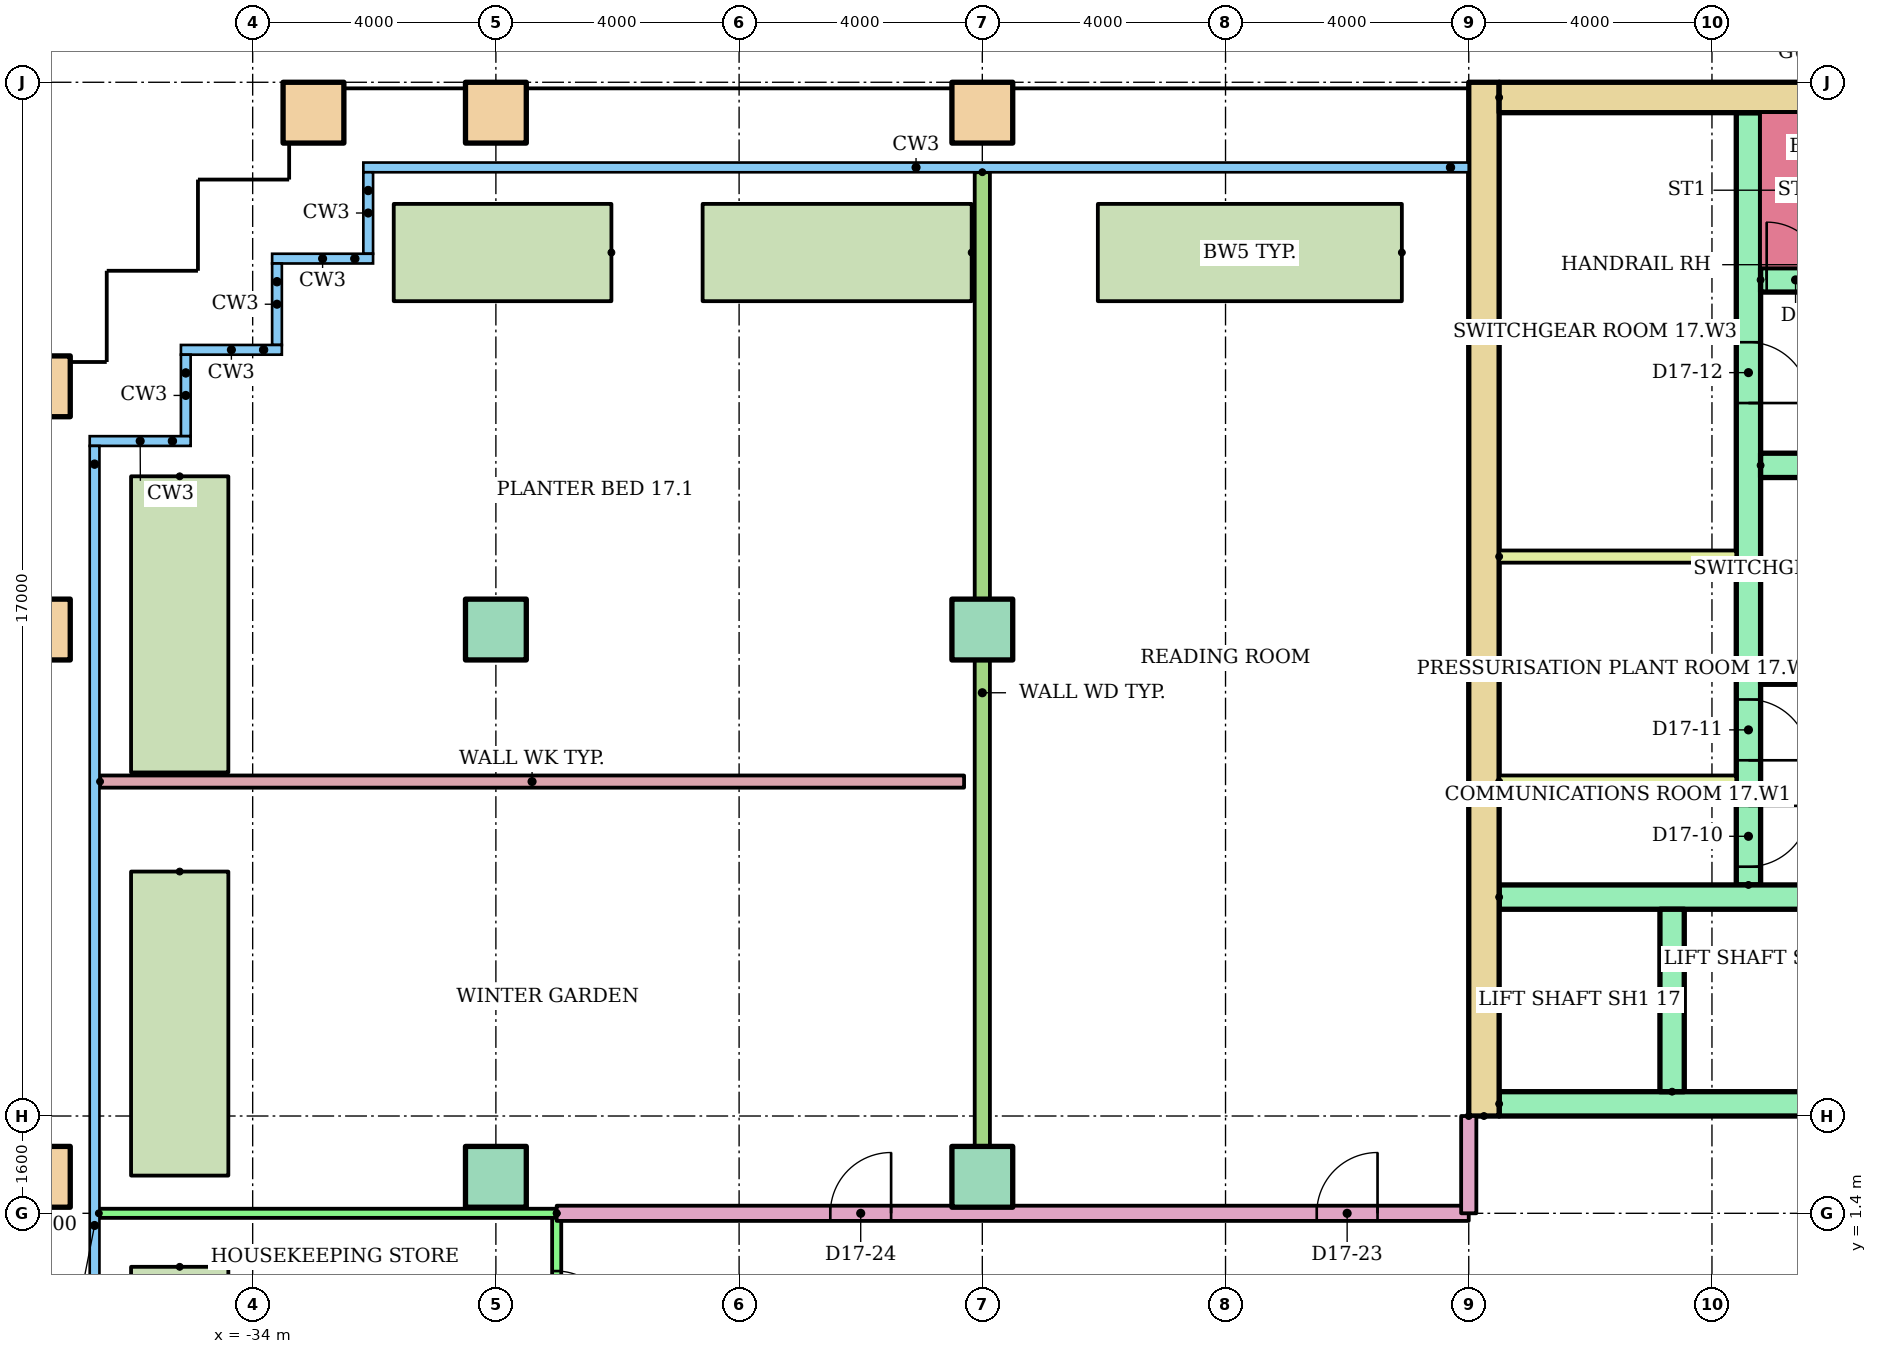
"""IFC4 building model, lengths in metres.
Left out: names, types, materials, properties, quantities, classifications, styles, units other than length and angle.
Written with IfcOpenShell. Run it as: python <this file> out.ifc"""

import sys

from ifc_helpers import new_model, si_unit, direction, frame, frame_2d, origin, origin_2d, place, context, subcontext, project, spatial, rectangle, hollow_rectangle, extrude, element, fill, save


model = new_model("IFC4")
c1 = context("Model", 3, precision=1e-05, world=origin(), true_north=direction((0.0, 1.0)))
c2 = subcontext(c1, "Body", "Model", "MODEL_VIEW")
j1 = project(units=[si_unit("LENGTHUNIT", "METRE"), si_unit("PLANEANGLEUNIT", "RADIAN")], contexts=[c1])
p1 = place(None, origin())
s1 = spatial("IfcSite", under=j1, at=p1, CompositionType="ELEMENT")
p2 = place(p1, origin())
s2 = spatial("IfcBuilding", under=s1, at=p2, CompositionType="ELEMENT")
p3 = place(p2, frame((0.0, 0.0, 64.0)))
s3 = spatial("IfcBuildingStorey", under=s2, at=p3, CompositionType="ELEMENT", Elevation=64.0)
p4 = place(p3, frame((-37.5, 2.0, 0.0)))
e1 = element("IfcColumn", 1, at=p4, inside=s3, PredefinedType="COLUMN", context=c2, shape_type="SweptSolid", body=[
    extrude(hollow_rectangle(XDim=1.0, YDim=1.0, WallThickness=0.05, at=origin_2d()), origin(), (0.0, 0.0, 1.0), 9.25),
])
p5 = place(p3, frame((-30.0, 2.0, 0.0)))
e2 = element("IfcColumn", 2, at=p5, inside=s3, PredefinedType="COLUMN", context=c2, shape_type="SweptSolid", body=[
    extrude(rectangle(XDim=1.0, YDim=1.0, at=origin_2d()), origin(), (0.0, 0.0, 1.0), 8.8),
])
p6 = place(p3, frame((-22.0, 2.0, 0.0)))
e3 = element("IfcColumn", 3, at=p6, inside=s3, PredefinedType="COLUMN", context=c2, shape_type="SweptSolid", body=[
    extrude(rectangle(XDim=1.0, YDim=1.0, at=origin_2d()), origin(), (0.0, 0.0, 1.0), 9.6),
])
p7 = place(p3, frame((-37.5, 11.0, 0.0)))
e4 = element("IfcColumn", 4, at=p7, inside=s3, PredefinedType="COLUMN", context=c2, shape_type="SweptSolid", body=[
    extrude(hollow_rectangle(XDim=1.0, YDim=1.0, WallThickness=0.05, at=origin_2d()), origin(), (0.0, 0.0, 1.0), 9.25),
])
p8 = place(p3, frame((-30.0, 11.0, 0.0)))
e5 = element("IfcColumn", 5, at=p8, inside=s3, PredefinedType="COLUMN", context=c2, shape_type="SweptSolid", body=[
    extrude(rectangle(XDim=1.0, YDim=1.0, at=origin_2d()), origin(), (0.0, 0.0, 1.0), 8.8),
])
p9 = place(p3, frame((-22.0, 11.0, 0.0)))
e6 = element("IfcColumn", 6, at=p9, inside=s3, PredefinedType="COLUMN", context=c2, shape_type="SweptSolid", body=[
    extrude(rectangle(XDim=1.0, YDim=1.0, at=origin_2d()), origin(), (0.0, 0.0, 1.0), 9.6),
])
for number, where in (
    (7, (-37.5, 15.0, 0.0)),
    (8, (-33.0, 19.5, 0.0)),
):
    element("IfcColumn", number, at=place(p3, frame(where)), inside=s3, PredefinedType="COLUMN", context=c2, shape_type="SweptSolid", body=[
        extrude(hollow_rectangle(XDim=1.0, YDim=1.0, WallThickness=0.05, at=origin_2d()), origin(), (0.0, 0.0, 1.0), 9.25),
    ])
p10 = place(p3, frame((-30.0, 19.5, 0.0)))
e9 = element("IfcColumn", 9, at=p10, inside=s3, PredefinedType="COLUMN", context=c2, shape_type="SweptSolid", body=[
    extrude(hollow_rectangle(XDim=1.0, YDim=1.0, WallThickness=0.05, at=origin_2d()), origin(), (0.0, 0.0, 1.0), 8.8),
])
p11 = place(p3, frame((-22.0, 19.5, 0.0)))
e10 = element("IfcColumn", 10, at=p11, inside=s3, PredefinedType="COLUMN", context=c2, shape_type="SweptSolid", body=[
    extrude(hollow_rectangle(XDim=1.0, YDim=1.0, WallThickness=0.05, at=origin_2d()), origin(), (0.0, 0.0, 1.0), 9.6),
])
p12 = place(p3, frame((-15.1, 17.2, 0.0), z_axis=(0.0, 0.0, 1.0), x_axis=(-1.0, 0.0, 0.0)))
e11 = element("IfcWall", 11, at=p12, inside=s3, PredefinedType="STANDARD", context=c2, shape_type="SweptSolid", body=[
    extrude(rectangle(XDim=5.0, YDim=1.6, at=frame_2d((2.5, 0.0))), origin(), (0.0, 0.0, 1.0), 0.8),
])
p13 = place(p3, frame((-28.1, 17.2, 0.0), z_axis=(0.0, 0.0, 1.0), x_axis=(-1.0, 0.0, 0.0)))
e12 = element("IfcWall", 12, at=p13, inside=s3, PredefinedType="STANDARD", context=c2, shape_type="SweptSolid", body=[
    extrude(rectangle(XDim=3.58, YDim=1.6, at=frame_2d((1.79, 0.0))), origin(), (0.0, 0.0, 1.0), 0.8),
])
p14 = place(p3, frame((-35.2, 7.02, 0.0), z_axis=(0.0, 0.0, 1.0), x_axis=(0.0, -1.0, 0.0)))
e13 = element("IfcWall", 13, at=p14, inside=s3, PredefinedType="STANDARD", context=c2, shape_type="SweptSolid", body=[
    extrude(rectangle(XDim=5.0, YDim=1.6, at=frame_2d((2.5, 0.0))), origin(), (0.0, 0.0, 1.0), 0.8),
])
p15 = place(p3, frame((-13.75, 3.0, 0.0), z_axis=(0.0, 0.0, 1.0), x_axis=(0.0, 1.0, 0.0)))
e14 = element("IfcWall", 14, at=p15, inside=s3, PredefinedType="SHEAR", context=c2, shape_type="SweptSolid", body=[
    extrude(rectangle(XDim=17.0, YDim=0.5, at=frame_2d((8.5, 0.0))), origin(), (0.0, 0.0, 1.0), 8.8),
])
p16 = place(p3, frame((-13.5, 19.75, 0.0)))
e15 = element("IfcWall", 15, at=p16, inside=s3, PredefinedType="SHEAR", context=c2, shape_type="SweptSolid", body=[
    extrude(rectangle(XDim=27.0, YDim=0.5, at=frame_2d((13.5, 0.0))), origin(), (0.0, 0.0, 1.0), 8.8),
])
p17 = place(p3, frame((-9.4, 6.8, 0.0), z_axis=(0.0, 0.0, 1.0), x_axis=(0.0, 1.0, 0.0)))
e16 = element("IfcWall", 16, at=p17, inside=s3, PredefinedType="SHEAR", context=c2, shape_type="SweptSolid", body=[
    extrude(rectangle(XDim=12.7, YDim=0.4, at=frame_2d((6.35, 0.0))), origin(), (0.0, 0.0, 1.0), 8.8),
])
p18 = place(p17, frame((0.3, 0.0, 0.0)))
e17 = element("IfcOpeningElement", 17, at=p18, cuts=e16, PredefinedType="OPENING", context=c2, shape_type="SweptSolid", body=[
    extrude(rectangle(XDim=1.0, YDim=2.1, at=frame_2d((0.5, 1.05))), frame((0.0, 0.21, 0.0), z_axis=(0.0, -1.0, 0.0), x_axis=(1.0, 0.0, 0.0)), (0.0, 0.0, 1.0), 0.42),
])
p19 = place(p17, frame((2.05, 0.0, 0.0)))
e18 = element("IfcOpeningElement", 18, at=p19, cuts=e16, PredefinedType="OPENING", context=c2, shape_type="SweptSolid", body=[
    extrude(rectangle(XDim=1.0, YDim=2.1, at=frame_2d((0.5, 1.05))), frame((0.0, 0.21, 0.0), z_axis=(0.0, -1.0, 0.0), x_axis=(1.0, 0.0, 0.0)), (0.0, 0.0, 1.0), 0.42),
])
p20 = place(p17, frame((7.925, 0.0, 0.0)))
e19 = element("IfcOpeningElement", 19, at=p20, cuts=e16, PredefinedType="OPENING", context=c2, shape_type="SweptSolid", body=[
    extrude(rectangle(XDim=1.0, YDim=2.1, at=frame_2d((0.5, 1.05))), frame((0.0, 0.21, 0.0), z_axis=(0.0, -1.0, 0.0), x_axis=(1.0, 0.0, 0.0)), (0.0, 0.0, 1.0), 0.42),
])
p21 = place(p3, frame((-13.5, 3.2, 0.0)))
e20 = element("IfcWall", 20, at=p21, inside=s3, PredefinedType="SHEAR", context=c2, shape_type="SweptSolid", body=[
    extrude(rectangle(XDim=27.0, YDim=0.4, at=frame_2d((13.5, 0.0))), origin(), (0.0, 0.0, 1.0), 8.8),
])
p22 = place(p21, frame((6.861, 0.0, 0.0)))
e21 = element("IfcOpeningElement", 21, at=p22, cuts=e20, PredefinedType="OPENING", context=c2, shape_type="SweptSolid", body=[
    extrude(rectangle(XDim=1.1, YDim=2.1, at=frame_2d((0.55, 1.05))), frame((0.0, 0.21, 0.0), z_axis=(0.0, -1.0, 0.0), x_axis=(1.0, 0.0, 0.0)), (0.0, 0.0, 1.0), 0.42),
])
p23 = place(p21, frame((9.906, 0.0, 0.0)))
e22 = element("IfcOpeningElement", 22, at=p23, cuts=e20, PredefinedType="OPENING", context=c2, shape_type="SweptSolid", body=[
    extrude(rectangle(XDim=1.1, YDim=2.1, at=frame_2d((0.55, 1.05))), frame((0.0, 0.21, 0.0), z_axis=(0.0, -1.0, 0.0), x_axis=(1.0, 0.0, 0.0)), (0.0, 0.0, 1.0), 0.42),
])
p24 = place(p21, frame((15.994, 0.0, 0.0)))
e23 = element("IfcOpeningElement", 23, at=p24, cuts=e20, PredefinedType="OPENING", context=c2, shape_type="SweptSolid", body=[
    extrude(rectangle(XDim=1.1, YDim=2.1, at=frame_2d((0.55, 1.05))), frame((0.0, 0.21, 0.0), z_axis=(0.0, -1.0, 0.0), x_axis=(1.0, 0.0, 0.0)), (0.0, 0.0, 1.0), 0.42),
])
p25 = place(p21, frame((19.039, 0.0, 0.0)))
e24 = element("IfcOpeningElement", 24, at=p25, cuts=e20, PredefinedType="OPENING", context=c2, shape_type="SweptSolid", body=[
    extrude(rectangle(XDim=1.1, YDim=2.1, at=frame_2d((0.55, 1.05))), frame((0.0, 0.21, 0.0), z_axis=(0.0, -1.0, 0.0), x_axis=(1.0, 0.0, 0.0)), (0.0, 0.0, 1.0), 0.42),
])
p26 = place(p21, frame((12.6, 0.0, 0.0)))
e25 = element("IfcOpeningElement", 25, at=p26, cuts=e20, PredefinedType="OPENING", context=c2, shape_type="SweptSolid", body=[
    extrude(rectangle(XDim=1.8, YDim=2.1, at=frame_2d((0.9, 1.05))), frame((0.0, 0.21, 0.0), z_axis=(0.0, -1.0, 0.0), x_axis=(1.0, 0.0, 0.0)), (0.0, 0.0, 1.0), 0.42),
])
p27 = place(p3, frame((-13.5, 6.6, 0.0)))
e26 = element("IfcWall", 26, at=p27, inside=s3, PredefinedType="SHEAR", context=c2, shape_type="SweptSolid", body=[
    extrude(rectangle(XDim=11.978, YDim=0.4, at=frame_2d((5.989, 0.0))), origin(), (0.0, 0.0, 1.0), 8.8),
])
p28 = place(p3, frame((-10.656, 3.4, 0.0), z_axis=(0.0, 0.0, 1.0), x_axis=(0.0, 1.0, 0.0)))
e27 = element("IfcWall", 27, at=p28, inside=s3, PredefinedType="SHEAR", context=c2, shape_type="SweptSolid", body=[
    extrude(rectangle(XDim=3.0, YDim=0.4, at=frame_2d((1.5, 0.0))), origin(), (0.0, 0.0, 1.0), 8.8),
])
p29 = place(p3, frame((-9.2, 10.3, 0.0)))
e28 = element("IfcWall", 28, at=p29, inside=s3, PredefinedType="SHEAR", context=c2, shape_type="SweptSolid", body=[
    extrude(rectangle(XDim=8.0, YDim=0.4, at=frame_2d((4.0, 0.0))), origin(), (0.0, 0.0, 1.0), 8.8),
])
p30 = place(p29, frame((0.917, 0.0, 0.0)))
e29 = element("IfcOpeningElement", 29, at=p30, cuts=e28, PredefinedType="OPENING", context=c2, shape_type="SweptSolid", body=[
    extrude(rectangle(XDim=1.0, YDim=2.1, at=frame_2d((0.5, 1.05))), frame((0.0, 0.21, 0.0), z_axis=(0.0, -1.0, 0.0), x_axis=(1.0, 0.0, 0.0)), (0.0, 0.0, 1.0), 0.42),
])
p31 = place(p29, frame((3.4, 0.0, 0.0)))
e30 = element("IfcOpeningElement", 30, at=p31, cuts=e28, PredefinedType="OPENING", context=c2, shape_type="SweptSolid", body=[
    extrude(rectangle(XDim=1.0, YDim=2.1, at=frame_2d((0.5, 1.05))), frame((0.0, 0.21, 0.0), z_axis=(0.0, -1.0, 0.0), x_axis=(1.0, 0.0, 0.0)), (0.0, 0.0, 1.0), 0.42),
])
p32 = place(p29, frame((6.133, 0.0, 0.0)))
e31 = element("IfcOpeningElement", 31, at=p32, cuts=e28, PredefinedType="OPENING", context=c2, shape_type="SweptSolid", body=[
    extrude(rectangle(XDim=1.0, YDim=2.1, at=frame_2d((0.5, 1.05))), frame((0.0, 0.21, 0.0), z_axis=(0.0, -1.0, 0.0), x_axis=(1.0, 0.0, 0.0)), (0.0, 0.0, 1.0), 0.42),
])
p33 = place(p3, frame((-9.2, 13.7, 0.0)))
e32 = element("IfcWall", 32, at=p33, inside=s3, PredefinedType="SHEAR", context=c2, shape_type="SweptSolid", body=[
    extrude(rectangle(XDim=8.0, YDim=0.4, at=frame_2d((4.0, 0.0))), origin(), (0.0, 0.0, 1.0), 8.8),
])
p34 = place(p3, frame((-9.2, 16.75, 0.0)))
e33 = element("IfcWall", 33, at=p34, inside=s3, PredefinedType="SHEAR", context=c2, shape_type="SweptSolid", body=[
    extrude(rectangle(XDim=18.4, YDim=0.4, at=frame_2d((9.2, 0.0))), origin(), (0.0, 0.0, 1.0), 8.8),
])
p35 = place(p34, frame((0.1, 0.0, 0.0)))
e34 = element("IfcOpeningElement", 34, at=p35, cuts=e33, PredefinedType="OPENING", context=c2, shape_type="SweptSolid", body=[
    extrude(rectangle(XDim=0.95, YDim=2.1, at=frame_2d((0.475, 1.05))), frame((0.0, 0.21, 0.0), z_axis=(0.0, -1.0, 0.0), x_axis=(1.0, 0.0, 0.0)), (0.0, 0.0, 1.0), 0.42),
])
p36 = place(p34, frame((6.1, 0.0, 0.0)))
e35 = element("IfcOpeningElement", 35, at=p36, cuts=e33, PredefinedType="OPENING", context=c2, shape_type="SweptSolid", body=[
    extrude(rectangle(XDim=0.95, YDim=2.1, at=frame_2d((0.475, 1.05))), frame((0.0, 0.21, 0.0), z_axis=(0.0, -1.0, 0.0), x_axis=(1.0, 0.0, 0.0)), (0.0, 0.0, 1.0), 0.42),
])
p37 = place(p34, frame((12.1, 0.0, 0.0)))
e36 = element("IfcOpeningElement", 36, at=p37, cuts=e33, PredefinedType="OPENING", context=c2, shape_type="SweptSolid", body=[
    extrude(rectangle(XDim=0.95, YDim=2.1, at=frame_2d((0.475, 1.05))), frame((0.0, 0.21, 0.0), z_axis=(0.0, -1.0, 0.0), x_axis=(1.0, 0.0, 0.0)), (0.0, 0.0, 1.0), 0.42),
])
for number, where in (
    (37, (-13.5, 8.5, 0.0)),
    (38, (-13.5, 12.2, 0.0)),
):
    element("IfcWall", number, at=place(p3, frame(where)), inside=s3, PredefinedType="PARTITIONING", context=c2, shape_type="SweptSolid", body=[
        extrude(rectangle(XDim=3.9, YDim=0.2, at=frame_2d((1.95, 0.0))), origin(), (0.0, 0.0, 1.0), 8.8),
    ])
p38 = place(p3, frame((-29.0, 1.4, 0.0), z_axis=(0.0, 0.0, 1.0), x_axis=(0.0, -1.0, 0.0)))
e39 = element("IfcWall", 39, at=p38, inside=s3, PredefinedType="PARTITIONING", context=c2, shape_type="SweptSolid", body=[
    extrude(rectangle(XDim=2.8, YDim=0.15, at=frame_2d((1.4, 0.0))), origin(), (0.0, 0.0, 1.0), 8.8),
])
p39 = place(p38, frame((0.95, 0.0, 0.0)))
e40 = element("IfcOpeningElement", 40, at=p39, cuts=e39, PredefinedType="OPENING", context=c2, shape_type="SweptSolid", body=[
    extrude(rectangle(XDim=0.9, YDim=2.1, at=frame_2d((0.45, 1.05))), frame((0.0, 0.085, 0.0), z_axis=(0.0, -1.0, 0.0), x_axis=(1.0, 0.0, 0.0)), (0.0, 0.0, 1.0), 0.17),
])
p40 = place(p3, frame((-29.0, 1.4, 0.0)))
e41 = element("IfcWall", 41, at=p40, inside=s3, PredefinedType="PARTITIONING", context=c2, shape_type="SweptSolid", body=[
    extrude(rectangle(XDim=15.0, YDim=0.25, at=frame_2d((7.5, 0.0))), origin(), (0.0, 0.0, 1.0), 8.8),
])
p41 = place(p40, frame((12.5, 0.0, 0.0)))
e42 = element("IfcOpeningElement", 42, at=p41, cuts=e41, PredefinedType="OPENING", context=c2, shape_type="SweptSolid", body=[
    extrude(rectangle(XDim=1.0, YDim=2.1, at=frame_2d((0.5, 1.05))), frame((0.0, 0.135, 0.0), z_axis=(0.0, -1.0, 0.0), x_axis=(1.0, 0.0, 0.0)), (0.0, 0.0, 1.0), 0.27),
])
p42 = place(p40, frame((4.5, 0.0, 0.0)))
e43 = element("IfcOpeningElement", 43, at=p42, cuts=e41, PredefinedType="OPENING", context=c2, shape_type="SweptSolid", body=[
    extrude(rectangle(XDim=1.0, YDim=2.1, at=frame_2d((0.5, 1.05))), frame((0.0, 0.135, 0.0), z_axis=(0.0, -1.0, 0.0), x_axis=(1.0, 0.0, 0.0)), (0.0, 0.0, 1.0), 0.27),
])
p43 = place(p3, frame((-36.53, 1.4, 0.0)))
e44 = element("IfcWall", 44, at=p43, inside=s3, PredefinedType="PARTITIONING", context=c2, shape_type="SweptSolid", body=[
    extrude(rectangle(XDim=7.53, YDim=0.15, at=frame_2d((3.765, 0.0))), origin(), (0.0, 0.0, 1.0), 8.8),
])
p44 = place(p3, frame((-22.0, 18.521, 0.0), z_axis=(0.0, 0.0, 1.0), x_axis=(0.0, -1.0, 0.0)))
e45 = element("IfcWall", 45, at=p44, inside=s3, PredefinedType="PARTITIONING", context=c2, shape_type="SweptSolid", body=[
    extrude(rectangle(XDim=17.121, YDim=0.25, at=frame_2d((8.561, 0.0))), origin(), (0.0, 0.0, 1.0), 8.8),
])
p45 = place(p3, frame((-14.0, 3.0, 0.0), z_axis=(0.0, 0.0, 1.0), x_axis=(0.0, -1.0, 0.0)))
e46 = element("IfcWall", 46, at=p45, inside=s3, PredefinedType="PARTITIONING", context=c2, shape_type="SweptSolid", body=[
    extrude(rectangle(XDim=1.6, YDim=0.25, at=frame_2d((0.8, 0.0))), origin(), (0.0, 0.0, 1.0), 8.8),
])
p46 = place(p3, frame((-36.51, 8.5, 0.0)))
e47 = element("IfcWall", 47, at=p46, inside=s3, PredefinedType="PARTITIONING", context=c2, shape_type="SweptSolid", body=[
    extrude(rectangle(XDim=14.21, YDim=0.2, at=frame_2d((7.105, 0.0))), origin(), (0.0, 0.0, 1.0), 0.9),
])
p47 = place(p3, frame((-22.175, 17.2, 0.0), z_axis=(0.0, 0.0, 1.0), x_axis=(-1.0, 0.0, 0.0)))
e48 = element("IfcWall", 48, at=p47, inside=s3, PredefinedType="STANDARD", context=c2, shape_type="SweptSolid", body=[
    extrude(rectangle(XDim=4.425, YDim=1.6, at=frame_2d((2.212, 0.0))), origin(), (0.0, 0.0, 1.0), 0.8),
])
p48 = place(p3, frame((-35.2, 13.52, 0.0), z_axis=(0.0, 0.0, 1.0), x_axis=(0.0, -1.0, 0.0)))
e49 = element("IfcWall", 49, at=p48, inside=s3, PredefinedType="STANDARD", context=c2, shape_type="SweptSolid", body=[
    extrude(rectangle(XDim=4.87, YDim=1.6, at=frame_2d((2.435, 0.0))), origin(), (0.0, 0.0, 1.0), 0.8),
])
p49 = place(p3, frame((-35.2, 0.52, 0.0), z_axis=(0.0, 0.0, 1.0), x_axis=(0.0, -1.0, 0.0)))
e50 = element("IfcWall", 50, at=p49, inside=s3, PredefinedType="STANDARD", context=c2, shape_type="SweptSolid", body=[
    extrude(rectangle(XDim=1.795, YDim=1.6, at=frame_2d((0.897, 0.0))), origin(), (0.0, 0.0, 1.0), 0.8),
])
p50 = place(p35, origin())
e51 = element("IfcDoor", 51, at=p50, inside=s3, OperationType="SINGLE_SWING_LEFT", PredefinedType="DOOR", context=c2, shape_type="SweptSolid", body=[
    extrude(rectangle(XDim=0.95, YDim=2.1, at=frame_2d((0.475, 1.05))), frame((0.0, 0.025, 0.0), z_axis=(0.0, -1.0, 0.0), x_axis=(1.0, 0.0, 0.0)), (0.0, 0.0, 1.0), 0.05),
])
fill(e34, e51)
p51 = place(p18, frame((1.0, 0.0, 0.0), z_axis=(0.0, 0.0, 1.0), x_axis=(-1.0, 0.0, 0.0)))
e52 = element("IfcDoor", 52, at=p51, inside=s3, OperationType="SINGLE_SWING_RIGHT", PredefinedType="DOOR", context=c2, shape_type="SweptSolid", body=[
    extrude(rectangle(XDim=1.0, YDim=2.1, at=frame_2d((0.5, 1.05))), frame((0.0, 0.025, 0.0), z_axis=(0.0, -1.0, 0.0), x_axis=(1.0, 0.0, 0.0)), (0.0, 0.0, 1.0), 0.05),
])
fill(e17, e52)
p52 = place(p19, frame((1.0, 0.0, 0.0), z_axis=(0.0, 0.0, 1.0), x_axis=(-1.0, 0.0, 0.0)))
e53 = element("IfcDoor", 53, at=p52, inside=s3, OperationType="SINGLE_SWING_LEFT", PredefinedType="DOOR", context=c2, shape_type="SweptSolid", body=[
    extrude(rectangle(XDim=1.0, YDim=2.1, at=frame_2d((0.5, 1.05))), frame((0.0, 0.025, 0.0), z_axis=(0.0, -1.0, 0.0), x_axis=(1.0, 0.0, 0.0)), (0.0, 0.0, 1.0), 0.05),
])
fill(e18, e53)
p53 = place(p20, frame((1.0, 0.0, 0.0), z_axis=(0.0, 0.0, 1.0), x_axis=(-1.0, 0.0, 0.0)))
e54 = element("IfcDoor", 54, at=p53, inside=s3, OperationType="SINGLE_SWING_LEFT", PredefinedType="DOOR", context=c2, shape_type="SweptSolid", body=[
    extrude(rectangle(XDim=1.0, YDim=2.1, at=frame_2d((0.5, 1.05))), frame((0.0, 0.025, 0.0), z_axis=(0.0, -1.0, 0.0), x_axis=(1.0, 0.0, 0.0)), (0.0, 0.0, 1.0), 0.05),
])
fill(e19, e54)
p54 = place(p39, origin())
e55 = element("IfcDoor", 55, at=p54, inside=s3, OperationType="SINGLE_SWING_RIGHT", PredefinedType="DOOR", context=c2, shape_type="SweptSolid", body=[
    extrude(rectangle(XDim=0.9, YDim=2.1, at=frame_2d((0.45, 1.05))), frame((0.0, 0.025, 0.0), z_axis=(0.0, -1.0, 0.0), x_axis=(1.0, 0.0, 0.0)), (0.0, 0.0, 1.0), 0.05),
])
fill(e40, e55)
p55 = place(p41, origin())
e56 = element("IfcDoor", 56, at=p55, inside=s3, OperationType="SINGLE_SWING_RIGHT", PredefinedType="DOOR", context=c2, shape_type="SweptSolid", body=[
    extrude(rectangle(XDim=1.0, YDim=2.1, at=frame_2d((0.5, 1.05))), frame((0.0, 0.025, 0.0), z_axis=(0.0, -1.0, 0.0), x_axis=(1.0, 0.0, 0.0)), (0.0, 0.0, 1.0), 0.05),
])
fill(e42, e56)
p56 = place(p42, origin())
e57 = element("IfcDoor", 57, at=p56, inside=s3, OperationType="SINGLE_SWING_RIGHT", PredefinedType="DOOR", context=c2, shape_type="SweptSolid", body=[
    extrude(rectangle(XDim=1.0, YDim=2.1, at=frame_2d((0.5, 1.05))), frame((0.0, 0.025, 0.0), z_axis=(0.0, -1.0, 0.0), x_axis=(1.0, 0.0, 0.0)), (0.0, 0.0, 1.0), 0.05),
])
fill(e43, e57)
save(model, sys.argv[1])
